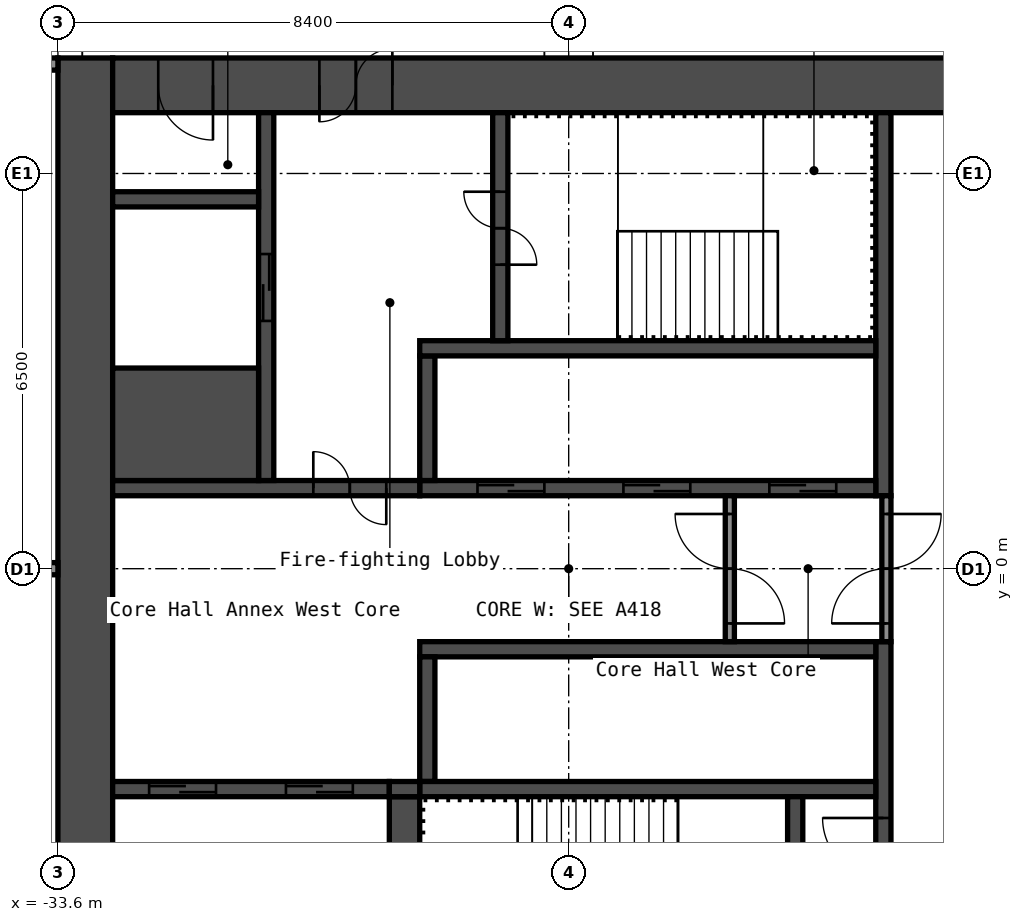
"""IFC4 building model, lengths in metres.
Left out: names, types, materials, properties, quantities, classifications, styles, units other than length and angle.
Written with IfcOpenShell. Run it as: python <this file> out.ifc"""

import sys

from ifc_helpers import new_model, si_unit, direction, frame, frame_2d, origin, place, context, subcontext, project, spatial, rectangle, extrude, element, fill, save


model = new_model("IFC4")
c1 = context("Model", 3, precision=1e-05, world=origin(), true_north=direction((0.0, 1.0)))
c2 = subcontext(c1, "Body", "Model", "MODEL_VIEW")
j1 = project(units=[si_unit("LENGTHUNIT", "METRE"), si_unit("PLANEANGLEUNIT", "RADIAN")], contexts=[c1])
p1 = place(None, origin())
s1 = spatial("IfcSite", under=j1, at=p1, CompositionType="ELEMENT")
p2 = place(p1, origin())
s2 = spatial("IfcBuilding", under=s1, at=p2, CompositionType="ELEMENT")
p3 = place(p2, frame((0.0, 0.0, 120.2)))
s3 = spatial("IfcBuildingStorey", under=s2, at=p3, CompositionType="ELEMENT", Elevation=120.2)
p4 = place(p3, frame((-33.15, -8.4, 0.0), z_axis=(0.0, 0.0, 1.0), x_axis=(0.0, 1.0, 0.0)))
e1 = element("IfcWall", 1, at=p4, inside=s3, PredefinedType="SHEAR", context=c2, shape_type="SweptSolid", body=[
    extrude(rectangle(XDim=16.8, YDim=0.9, at=frame_2d((8.4, 0.0))), origin(), (0.0, 0.0, 1.0), 4.1),
])
p5 = place(p3, frame((-32.7, 7.95, 0.0), z_axis=(0.0, 0.0, 1.0), x_axis=(1.0, 0.0, 0.0)))
e2 = element("IfcWall", 2, at=p5, inside=s3, PredefinedType="SHEAR", context=c2, shape_type="SweptSolid", body=[
    extrude(rectangle(XDim=15.0, YDim=0.9, at=frame_2d((7.5, 0.0))), origin(), (0.0, 0.0, 1.0), 4.1),
])
p6 = place(p5, frame((3.4, 0.0, 0.0)))
e3 = element("IfcOpeningElement", 3, at=p6, cuts=e2, PredefinedType="OPENING", context=c2, shape_type="SweptSolid", body=[
    extrude(rectangle(XDim=1.2, YDim=2.1, at=frame_2d((0.6, 1.05))), frame((0.0, 0.46, 0.0), z_axis=(0.0, -1.0, 0.0), x_axis=(1.0, 0.0, 0.0)), (0.0, 0.0, 1.0), 0.92),
])
p7 = place(p5, frame((0.75, 0.0, 0.0)))
e4 = element("IfcOpeningElement", 4, at=p7, cuts=e2, PredefinedType="OPENING", context=c2, shape_type="SweptSolid", body=[
    extrude(rectangle(XDim=0.9, YDim=2.1, at=frame_2d((0.45, 1.05))), frame((0.0, 0.46, 0.0), z_axis=(0.0, -1.0, 0.0), x_axis=(1.0, 0.0, 0.0)), (0.0, 0.0, 1.0), 0.92),
])
p8 = place(p3, frame((-20.025, 1.2, 0.0), z_axis=(0.0, 0.0, 1.0), x_axis=(0.0, 1.0, 0.0)))
e5 = element("IfcWall", 5, at=p8, inside=s3, PredefinedType="SHEAR", context=c2, shape_type="SweptSolid", body=[
    extrude(rectangle(XDim=6.3, YDim=0.25, at=frame_2d((3.15, 0.0))), origin(), (0.0, 0.0, 1.0), 4.1),
])
p9 = place(p3, frame((-20.025, -7.5, 0.0), z_axis=(0.0, 0.0, 1.0), x_axis=(0.0, 1.0, 0.0)))
e6 = element("IfcWall", 6, at=p9, inside=s3, PredefinedType="SHEAR", context=c2, shape_type="SweptSolid", body=[
    extrude(rectangle(XDim=6.3, YDim=0.25, at=frame_2d((3.15, 0.0))), origin(), (0.0, 0.0, 1.0), 4.1),
])
p10 = place(p9, frame((2.4, 0.0, 0.0)))
e7 = element("IfcOpeningElement", 7, at=p10, cuts=e6, PredefinedType="OPENING", context=c2, shape_type="SweptSolid", body=[
    extrude(rectangle(XDim=1.0, YDim=2.1, at=frame_2d((0.5, 1.05))), frame((0.0, 0.135, 0.0), z_axis=(0.0, -1.0, 0.0), x_axis=(1.0, 0.0, 0.0)), (0.0, 0.0, 1.0), 0.27),
])
p11 = place(p3, frame((-27.65, 1.325, 0.0), z_axis=(0.0, 0.0, 1.0), x_axis=(1.0, 0.0, 0.0)))
e8 = element("IfcWall", 8, at=p11, inside=s3, PredefinedType="SHEAR", context=c2, shape_type="SweptSolid", body=[
    extrude(rectangle(XDim=7.5, YDim=0.25, at=frame_2d((3.75, 0.0))), origin(), (0.0, 0.0, 1.0), 4.1),
])
p12 = place(p11, frame((5.75, 0.0, 0.0)))
e9 = element("IfcOpeningElement", 9, at=p12, cuts=e8, PredefinedType="OPENING", context=c2, shape_type="SweptSolid", body=[
    extrude(rectangle(XDim=1.1, YDim=2.1, at=frame_2d((0.55, 1.05))), frame((0.0, 0.135, 0.0), z_axis=(0.0, -1.0, 0.0), x_axis=(1.0, 0.0, 0.0)), (0.0, 0.0, 1.0), 0.27),
])
p13 = place(p11, frame((3.35, 0.0, 0.0)))
e10 = element("IfcOpeningElement", 10, at=p13, cuts=e8, PredefinedType="OPENING", context=c2, shape_type="SweptSolid", body=[
    extrude(rectangle(XDim=1.1, YDim=2.1, at=frame_2d((0.55, 1.05))), frame((0.0, 0.135, 0.0), z_axis=(0.0, -1.0, 0.0), x_axis=(1.0, 0.0, 0.0)), (0.0, 0.0, 1.0), 0.27),
])
p14 = place(p11, frame((0.95, 0.0, 0.0)))
e11 = element("IfcOpeningElement", 11, at=p14, cuts=e8, PredefinedType="OPENING", context=c2, shape_type="SweptSolid", body=[
    extrude(rectangle(XDim=1.1, YDim=2.1, at=frame_2d((0.55, 1.05))), frame((0.0, 0.135, 0.0), z_axis=(0.0, -1.0, 0.0), x_axis=(1.0, 0.0, 0.0)), (0.0, 0.0, 1.0), 0.27),
])
p15 = place(p3, frame((-27.525, 1.45, 0.0), z_axis=(0.0, 0.0, 1.0), x_axis=(0.0, 1.0, 0.0)))
e12 = element("IfcWall", 12, at=p15, inside=s3, PredefinedType="SHEAR", context=c2, shape_type="SweptSolid", body=[
    extrude(rectangle(XDim=2.05, YDim=0.25, at=frame_2d((1.025, 0.0))), origin(), (0.0, 0.0, 1.0), 4.1),
])
p16 = place(p3, frame((-27.65, 3.625, 0.0), z_axis=(0.0, 0.0, 1.0), x_axis=(1.0, 0.0, 0.0)))
e13 = element("IfcWall", 13, at=p16, inside=s3, PredefinedType="SHEAR", context=c2, shape_type="SweptSolid", body=[
    extrude(rectangle(XDim=7.5, YDim=0.25, at=frame_2d((3.75, 0.0))), origin(), (0.0, 0.0, 1.0), 4.1),
])
p17 = place(p3, frame((-26.325, 3.75, 0.0), z_axis=(0.0, 0.0, 1.0), x_axis=(0.0, 1.0, 0.0)))
e14 = element("IfcWall", 14, at=p17, inside=s3, PredefinedType="SHEAR", context=c2, shape_type="SweptSolid", body=[
    extrude(rectangle(XDim=3.75, YDim=0.25, at=frame_2d((1.875, 0.0))), origin(), (0.0, 0.0, 1.0), 4.1),
])
p18 = place(p17, frame((1.25, 0.0, 0.0)))
e15 = element("IfcOpeningElement", 15, at=p18, cuts=e14, PredefinedType="OPENING", context=c2, shape_type="SweptSolid", body=[
    extrude(rectangle(XDim=1.2, YDim=2.1, at=frame_2d((0.6, 1.05))), frame((0.0, 0.135, 0.0), z_axis=(0.0, -1.0, 0.0), x_axis=(1.0, 0.0, 0.0)), (0.0, 0.0, 1.0), 0.27),
])
p19 = place(p3, frame((-32.7, 1.325, 0.0), z_axis=(0.0, 0.0, 1.0), x_axis=(1.0, 0.0, 0.0)))
e16 = element("IfcWall", 16, at=p19, inside=s3, PredefinedType="SHEAR", context=c2, shape_type="SweptSolid", body=[
    extrude(rectangle(XDim=5.05, YDim=0.25, at=frame_2d((2.525, 0.0))), origin(), (0.0, 0.0, 1.0), 4.1),
])
p20 = place(p19, frame((3.3, 0.0, 0.0)))
e17 = element("IfcOpeningElement", 17, at=p20, cuts=e16, PredefinedType="OPENING", context=c2, shape_type="SweptSolid", body=[
    extrude(rectangle(XDim=1.2, YDim=2.1, at=frame_2d((0.6, 1.05))), frame((0.0, 0.135, 0.0), z_axis=(0.0, -1.0, 0.0), x_axis=(1.0, 0.0, 0.0)), (0.0, 0.0, 1.0), 0.27),
])
p21 = place(p3, frame((-30.175, 1.45, 0.0), z_axis=(0.0, 0.0, 1.0), x_axis=(0.0, 1.0, 0.0)))
e18 = element("IfcWall", 18, at=p21, inside=s3, PredefinedType="SHEAR", context=c2, shape_type="SweptSolid", body=[
    extrude(rectangle(XDim=6.05, YDim=0.25, at=frame_2d((3.025, 0.0))), origin(), (0.0, 0.0, 1.0), 4.1),
])
p22 = place(p21, frame((2.625, 0.0, 0.0)))
e19 = element("IfcOpeningElement", 19, at=p22, cuts=e18, PredefinedType="OPENING", context=c2, shape_type="SweptSolid", body=[
    extrude(rectangle(XDim=1.1, YDim=2.1, at=frame_2d((0.55, 1.05))), frame((0.0, 0.135, 0.0), z_axis=(0.0, -1.0, 0.0), x_axis=(1.0, 0.0, 0.0)), (0.0, 0.0, 1.0), 0.27),
])
p23 = place(p3, frame((-32.7, 2.375, 0.0), z_axis=(0.0, 0.0, 1.0), x_axis=(1.0, 0.0, 0.0)))
e20 = element("IfcWall", 20, at=p23, inside=s3, PredefinedType="SHEAR", context=c2, shape_type="SweptSolid", body=[
    extrude(rectangle(XDim=2.4, YDim=1.85, at=frame_2d((1.2, 0.0))), origin(), (0.0, 0.0, 1.0), 4.1),
])
p24 = place(p3, frame((-32.7, 6.075, 0.0), z_axis=(0.0, 0.0, 1.0), x_axis=(1.0, 0.0, 0.0)))
e21 = element("IfcWall", 21, at=p24, inside=s3, PredefinedType="SHEAR", context=c2, shape_type="SweptSolid", body=[
    extrude(rectangle(XDim=2.4, YDim=0.25, at=frame_2d((1.2, 0.0))), origin(), (0.0, 0.0, 1.0), 4.1),
])
p25 = place(p3, frame((-27.65, -1.325, 0.0), z_axis=(0.0, 0.0, 1.0), x_axis=(1.0, 0.0, 0.0)))
e22 = element("IfcWall", 22, at=p25, inside=s3, PredefinedType="SHEAR", context=c2, shape_type="SweptSolid", body=[
    extrude(rectangle(XDim=7.5, YDim=0.25, at=frame_2d((3.75, 0.0))), origin(), (0.0, 0.0, 1.0), 4.1),
])
p26 = place(p3, frame((-27.525, -3.5, 0.0), z_axis=(0.0, 0.0, 1.0), x_axis=(0.0, 1.0, 0.0)))
e23 = element("IfcWall", 23, at=p26, inside=s3, PredefinedType="SHEAR", context=c2, shape_type="SweptSolid", body=[
    extrude(rectangle(XDim=2.05, YDim=0.25, at=frame_2d((1.025, 0.0))), origin(), (0.0, 0.0, 1.0), 4.1),
])
p27 = place(p3, frame((-27.65, -3.625, 0.0), z_axis=(0.0, 0.0, 1.0), x_axis=(1.0, 0.0, 0.0)))
e24 = element("IfcWall", 24, at=p27, inside=s3, PredefinedType="SHEAR", context=c2, shape_type="SweptSolid", body=[
    extrude(rectangle(XDim=7.5, YDim=0.25, at=frame_2d((3.75, 0.0))), origin(), (0.0, 0.0, 1.0), 4.1),
])
p28 = place(p3, frame((-21.475, -7.5, 0.0), z_axis=(0.0, 0.0, 1.0), x_axis=(0.0, 1.0, 0.0)))
e25 = element("IfcWall", 25, at=p28, inside=s3, PredefinedType="SHEAR", context=c2, shape_type="SweptSolid", body=[
    extrude(rectangle(XDim=3.75, YDim=0.25, at=frame_2d((1.875, 0.0))), origin(), (0.0, 0.0, 1.0), 4.1),
])
p29 = place(p28, frame((1.3, 0.0, 0.0)))
e26 = element("IfcOpeningElement", 26, at=p29, cuts=e25, PredefinedType="OPENING", context=c2, shape_type="SweptSolid", body=[
    extrude(rectangle(XDim=1.2, YDim=2.1, at=frame_2d((0.6, 1.05))), frame((0.0, 0.135, 0.0), z_axis=(0.0, -1.0, 0.0), x_axis=(1.0, 0.0, 0.0)), (0.0, 0.0, 1.0), 0.27),
])
p30 = place(p3, frame((-27.9, -7.5, 0.0), z_axis=(0.0, 0.0, 1.0), x_axis=(0.0, 1.0, 0.0)))
e27 = element("IfcWall", 27, at=p30, inside=s3, PredefinedType="SHEAR", context=c2, shape_type="SweptSolid", body=[
    extrude(rectangle(XDim=3.75, YDim=0.5, at=frame_2d((1.875, 0.0))), origin(), (0.0, 0.0, 1.0), 4.1),
])
p31 = place(p3, frame((-32.7, -3.625, 0.0), z_axis=(0.0, 0.0, 1.0), x_axis=(1.0, 0.0, 0.0)))
e28 = element("IfcWall", 28, at=p31, inside=s3, PredefinedType="SHEAR", context=c2, shape_type="SweptSolid", body=[
    extrude(rectangle(XDim=4.55, YDim=0.25, at=frame_2d((2.275, 0.0))), origin(), (0.0, 0.0, 1.0), 4.1),
])
p32 = place(p31, frame((2.85, 0.0, 0.0)))
e29 = element("IfcOpeningElement", 29, at=p32, cuts=e28, PredefinedType="OPENING", context=c2, shape_type="SweptSolid", body=[
    extrude(rectangle(XDim=1.1, YDim=2.1, at=frame_2d((0.55, 1.05))), frame((0.0, 0.135, 0.0), z_axis=(0.0, -1.0, 0.0), x_axis=(1.0, 0.0, 0.0)), (0.0, 0.0, 1.0), 0.27),
])
p33 = place(p31, frame((0.6, 0.0, 0.0)))
e30 = element("IfcOpeningElement", 30, at=p33, cuts=e28, PredefinedType="OPENING", context=c2, shape_type="SweptSolid", body=[
    extrude(rectangle(XDim=1.1, YDim=2.1, at=frame_2d((0.55, 1.05))), frame((0.0, 0.135, 0.0), z_axis=(0.0, -1.0, 0.0), x_axis=(1.0, 0.0, 0.0)), (0.0, 0.0, 1.0), 0.27),
])
p34 = place(p3, frame((-28.15, -3.625, 0.0), z_axis=(0.0, 0.0, 1.0), x_axis=(1.0, 0.0, 0.0)))
e31 = element("IfcWall", 31, at=p34, inside=s3, PredefinedType="SHEAR", context=c2, shape_type="SweptSolid", body=[
    extrude(rectangle(XDim=0.5, YDim=0.25, at=frame_2d((0.25, 0.0))), origin(), (0.0, 0.0, 1.0), 4.1),
])
p35 = place(p3, frame((-19.975, -1.2, 0.0), z_axis=(0.0, 0.0, 1.0), x_axis=(0.0, 1.0, 0.0)))
e32 = element("IfcWall", 32, at=p35, inside=s3, PredefinedType="PARTITIONING", context=c2, shape_type="SweptSolid", body=[
    extrude(rectangle(XDim=2.4, YDim=0.15, at=frame_2d((1.2, 0.0))), origin(), (0.0, 0.0, 1.0), 4.1),
])
p36 = place(p35, frame((0.3, 0.0, 0.0)))
e33 = element("IfcOpeningElement", 33, at=p36, cuts=e32, PredefinedType="OPENING", context=c2, shape_type="SweptSolid", body=[
    extrude(rectangle(XDim=1.8, YDim=2.1, at=frame_2d((0.9, 1.05))), frame((0.0, 0.085, 0.0), z_axis=(0.0, -1.0, 0.0), x_axis=(1.0, 0.0, 0.0)), (0.0, 0.0, 1.0), 0.17),
])
p37 = place(p3, frame((-22.55, -1.2, 0.0), z_axis=(0.0, 0.0, 1.0), x_axis=(0.0, 1.0, 0.0)))
e34 = element("IfcWall", 34, at=p37, inside=s3, PredefinedType="PARTITIONING", context=c2, shape_type="SweptSolid", body=[
    extrude(rectangle(XDim=2.4, YDim=0.15, at=frame_2d((1.2, 0.0))), origin(), (0.0, 0.0, 1.0), 4.1),
])
p38 = place(p37, frame((0.3, 0.0, 0.0)))
e35 = element("IfcOpeningElement", 35, at=p38, cuts=e34, PredefinedType="OPENING", context=c2, shape_type="SweptSolid", body=[
    extrude(rectangle(XDim=1.8, YDim=2.1, at=frame_2d((0.9, 1.05))), frame((0.0, 0.085, 0.0), z_axis=(0.0, -1.0, 0.0), x_axis=(1.0, 0.0, 0.0)), (0.0, 0.0, 1.0), 0.17),
])
p39 = place(p3, frame((-43.9, 0.0, 0.0), z_axis=(0.0, 0.0, 1.0), x_axis=(1.0, 0.0, 0.0)))
e36 = element("IfcWall", 36, at=p39, inside=s3, PredefinedType="PARTITIONING", context=c2, shape_type="SweptSolid", body=[
    extrude(rectangle(XDim=10.3, YDim=0.2, at=frame_2d((5.15, 0.0))), origin(), (0.0, 0.0, 1.0), 4.1),
])
p40 = place(p3, frame((-44.0, 8.3, 0.0), z_axis=(0.0, 0.0, 1.0), x_axis=(1.0, 0.0, 0.0)))
e37 = element("IfcWall", 37, at=p40, inside=s3, PredefinedType="PARTITIONING", context=c2, shape_type="SweptSolid", body=[
    extrude(rectangle(XDim=10.4, YDim=0.2, at=frame_2d((5.2, 0.0))), origin(), (0.0, 0.0, 1.0), 4.1),
])
p41 = place(p40, frame((4.75, 0.0, 0.0)))
e38 = element("IfcOpeningElement", 38, at=p41, cuts=e37, PredefinedType="OPENING", context=c2, shape_type="SweptSolid", body=[
    extrude(rectangle(XDim=0.9, YDim=2.1, at=frame_2d((0.45, 1.05))), frame((0.0, 0.11, 0.0), z_axis=(0.0, -1.0, 0.0), x_axis=(1.0, 0.0, 0.0)), (0.0, 0.0, 1.0), 0.22),
])
p42 = place(p6, origin())
e39 = element("IfcDoor", 39, at=p42, inside=s3, OperationType="DOUBLE_DOOR_SINGLE_SWING", PredefinedType="DOOR", context=c2, shape_type="SweptSolid", body=[
    extrude(rectangle(XDim=1.2, YDim=2.1, at=frame_2d((0.6, 1.05))), frame((0.0, 0.025, 0.0), z_axis=(0.0, -1.0, 0.0), x_axis=(1.0, 0.0, 0.0)), (0.0, 0.0, 1.0), 0.05),
])
fill(e3, e39)
p43 = place(p7, origin())
e40 = element("IfcDoor", 40, at=p43, inside=s3, OperationType="SINGLE_SWING_RIGHT", PredefinedType="DOOR", context=c2, shape_type="SweptSolid", body=[
    extrude(rectangle(XDim=0.9, YDim=2.1, at=frame_2d((0.45, 1.05))), frame((0.0, 0.025, 0.0), z_axis=(0.0, -1.0, 0.0), x_axis=(1.0, 0.0, 0.0)), (0.0, 0.0, 1.0), 0.05),
])
fill(e4, e40)
p44 = place(p18, origin())
e41 = element("IfcDoor", 41, at=p44, inside=s3, OperationType="DOUBLE_DOOR_SINGLE_SWING", PredefinedType="DOOR", context=c2, shape_type="SweptSolid", body=[
    extrude(rectangle(XDim=1.2, YDim=2.1, at=frame_2d((0.6, 1.05))), frame((0.0, 0.025, 0.0), z_axis=(0.0, -1.0, 0.0), x_axis=(1.0, 0.0, 0.0)), (0.0, 0.0, 1.0), 0.05),
])
fill(e15, e41)
p45 = place(p10, origin())
e42 = element("IfcDoor", 42, at=p45, inside=s3, OperationType="SINGLE_SWING_LEFT", PredefinedType="DOOR", context=c2, shape_type="SweptSolid", body=[
    extrude(rectangle(XDim=1.0, YDim=2.1, at=frame_2d((0.5, 1.05))), frame((0.0, 0.025, 0.0), z_axis=(0.0, -1.0, 0.0), x_axis=(1.0, 0.0, 0.0)), (0.0, 0.0, 1.0), 0.05),
])
fill(e7, e42)
p46 = place(p20, origin())
e43 = element("IfcDoor", 43, at=p46, inside=s3, OperationType="DOUBLE_DOOR_SINGLE_SWING", PredefinedType="DOOR", context=c2, shape_type="SweptSolid", body=[
    extrude(rectangle(XDim=1.2, YDim=2.1, at=frame_2d((0.6, 1.05))), frame((0.0, 0.025, 0.0), z_axis=(0.0, -1.0, 0.0), x_axis=(1.0, 0.0, 0.0)), (0.0, 0.0, 1.0), 0.05),
])
fill(e17, e43)
p47 = place(p36, origin())
e44 = element("IfcDoor", 44, at=p47, inside=s3, OperationType="DOUBLE_DOOR_SINGLE_SWING", PredefinedType="DOOR", context=c2, shape_type="SweptSolid", body=[
    extrude(rectangle(XDim=1.8, YDim=2.1, at=frame_2d((0.9, 1.05))), frame((0.0, 0.025, 0.0), z_axis=(0.0, -1.0, 0.0), x_axis=(1.0, 0.0, 0.0)), (0.0, 0.0, 1.0), 0.05),
])
fill(e33, e44)
p48 = place(p38, origin())
e45 = element("IfcDoor", 45, at=p48, inside=s3, OperationType="DOUBLE_DOOR_SINGLE_SWING", PredefinedType="DOOR", context=c2, shape_type="SweptSolid", body=[
    extrude(rectangle(XDim=1.8, YDim=2.1, at=frame_2d((0.9, 1.05))), frame((0.0, 0.025, 0.0), z_axis=(0.0, -1.0, 0.0), x_axis=(1.0, 0.0, 0.0)), (0.0, 0.0, 1.0), 0.05),
])
fill(e35, e45)
p49 = place(p12, origin())
e46 = element("IfcDoor", 46, at=p49, inside=s3, OperationType="DOUBLE_DOOR_SLIDING", PredefinedType="DOOR", context=c2, shape_type="SweptSolid", body=[
    extrude(rectangle(XDim=1.1, YDim=2.1, at=frame_2d((0.55, 1.05))), frame((0.0, 0.025, 0.0), z_axis=(0.0, -1.0, 0.0), x_axis=(1.0, 0.0, 0.0)), (0.0, 0.0, 1.0), 0.05),
])
fill(e9, e46)
p50 = place(p13, origin())
e47 = element("IfcDoor", 47, at=p50, inside=s3, OperationType="DOUBLE_DOOR_SLIDING", PredefinedType="DOOR", context=c2, shape_type="SweptSolid", body=[
    extrude(rectangle(XDim=1.1, YDim=2.1, at=frame_2d((0.55, 1.05))), frame((0.0, 0.025, 0.0), z_axis=(0.0, -1.0, 0.0), x_axis=(1.0, 0.0, 0.0)), (0.0, 0.0, 1.0), 0.05),
])
fill(e10, e47)
p51 = place(p14, origin())
e48 = element("IfcDoor", 48, at=p51, inside=s3, OperationType="DOUBLE_DOOR_SLIDING", PredefinedType="DOOR", context=c2, shape_type="SweptSolid", body=[
    extrude(rectangle(XDim=1.1, YDim=2.1, at=frame_2d((0.55, 1.05))), frame((0.0, 0.025, 0.0), z_axis=(0.0, -1.0, 0.0), x_axis=(1.0, 0.0, 0.0)), (0.0, 0.0, 1.0), 0.05),
])
fill(e11, e48)
p52 = place(p22, origin())
e49 = element("IfcDoor", 49, at=p52, inside=s3, OperationType="DOUBLE_DOOR_SLIDING", PredefinedType="DOOR", context=c2, shape_type="SweptSolid", body=[
    extrude(rectangle(XDim=1.1, YDim=2.1, at=frame_2d((0.55, 1.05))), frame((0.0, 0.025, 0.0), z_axis=(0.0, -1.0, 0.0), x_axis=(1.0, 0.0, 0.0)), (0.0, 0.0, 1.0), 0.05),
])
fill(e19, e49)
p53 = place(p32, origin())
e50 = element("IfcDoor", 50, at=p53, inside=s3, OperationType="DOUBLE_DOOR_SLIDING", PredefinedType="DOOR", context=c2, shape_type="SweptSolid", body=[
    extrude(rectangle(XDim=1.1, YDim=2.1, at=frame_2d((0.55, 1.05))), frame((0.0, 0.025, 0.0), z_axis=(0.0, -1.0, 0.0), x_axis=(1.0, 0.0, 0.0)), (0.0, 0.0, 1.0), 0.05),
])
fill(e29, e50)
p54 = place(p33, origin())
e51 = element("IfcDoor", 51, at=p54, inside=s3, OperationType="DOUBLE_DOOR_SLIDING", PredefinedType="DOOR", context=c2, shape_type="SweptSolid", body=[
    extrude(rectangle(XDim=1.1, YDim=2.1, at=frame_2d((0.55, 1.05))), frame((0.0, 0.025, 0.0), z_axis=(0.0, -1.0, 0.0), x_axis=(1.0, 0.0, 0.0)), (0.0, 0.0, 1.0), 0.05),
])
fill(e30, e51)
save(model, sys.argv[1])
